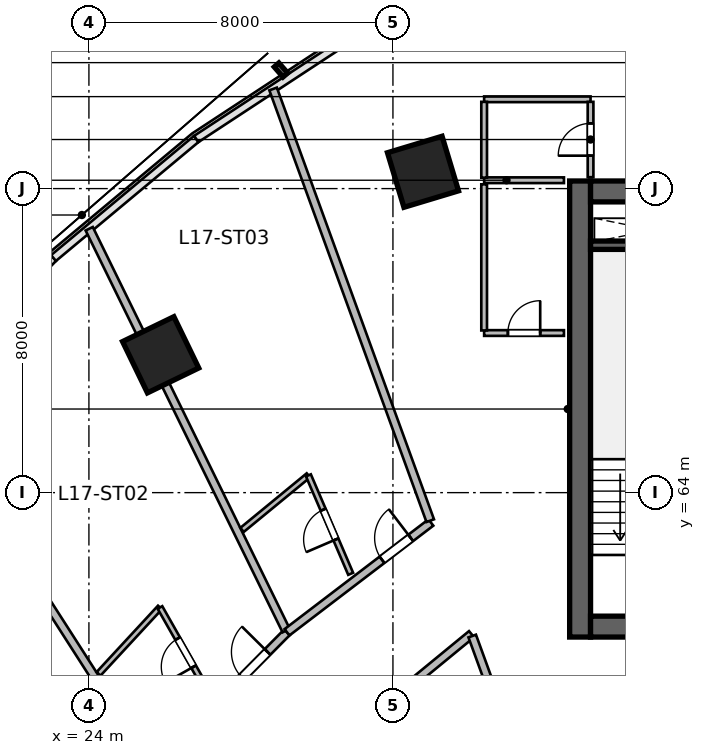
"""IFC4 building model, lengths in metres.
Left out: names, types, materials, properties, quantities, classifications, styles, units other than length and angle.
Written with IfcOpenShell. Run it as: python <this file> out.ifc"""

import sys

from ifc_helpers import new_model, si_unit, direction, frame, frame_2d, origin, origin_2d, place, context, subcontext, project, spatial, rectangle, extrude, source, transform, mapped, element, fill, save


model = new_model("IFC4")
c1 = context("Model", 3, precision=1e-05, world=origin(), true_north=direction((0.0, 1.0)))
c2 = subcontext(c1, "Body", "Model", "MODEL_VIEW")
j1 = project(units=[si_unit("LENGTHUNIT", "METRE"), si_unit("PLANEANGLEUNIT", "RADIAN")], contexts=[c1])
p1 = place(None, origin())
s1 = spatial("IfcSite", under=j1, at=p1, CompositionType="ELEMENT")
p2 = place(p1, origin())
s2 = spatial("IfcBuilding", under=s1, at=p2, CompositionType="ELEMENT")
p3 = place(p2, frame((0.0, 0.0, 75.0)))
s3 = spatial("IfcBuildingStorey", under=s2, at=p3, CompositionType="ELEMENT", Elevation=75.0)
m1 = source(origin(), c2, "Body", "SweptSolid", [
    extrude(rectangle(XDim=12.0, YDim=0.55, at=frame_2d((6.0, 0.0))), origin(), (0.0, 0.0, 1.0), 3.6),
])
p4 = place(p3, frame((36.925, 60.2, 0.0), z_axis=(0.0, 0.0, 1.0), x_axis=(0.0, 1.0, 0.0)))
e1 = element("IfcWall", 1, at=p4, inside=s3, PredefinedType="SHEAR", context=c2, shape_type="MappedRepresentation", body=[
    mapped(m1, transform((0.0, 0.0, 0.0), scale=1.0)),
])
m2 = source(origin(), c2, "Body", "SweptSolid", [
    extrude(rectangle(XDim=21.6, YDim=0.55, at=frame_2d((10.8, 0.0))), origin(), (0.0, 0.0, 1.0), 3.6),
])
p5 = place(p3, frame((37.2, 60.475, 0.0), z_axis=(0.0, 0.0, 1.0), x_axis=(1.0, 0.0, 0.0)))
e2 = element("IfcWall", 2, at=p5, inside=s3, PredefinedType="SHEAR", context=c2, shape_type="MappedRepresentation", body=[
    mapped(m2, transform((0.0, 0.0, 0.0), scale=1.0)),
])
p6 = place(p5, frame((1.1, 0.0, 0.0)))
e3 = element("IfcOpeningElement", 3, at=p6, cuts=e2, PredefinedType="OPENING", context=c2, shape_type="SweptSolid", body=[
    extrude(rectangle(XDim=1.15, YDim=2.15, at=frame_2d((0.575, 1.075))), frame((0.0, 0.285, 0.0), z_axis=(0.0, -1.0, 0.0), x_axis=(1.0, 0.0, 0.0)), (0.0, 0.0, 1.0), 0.57),
])
p7 = place(p5, frame((19.5, 0.0, 0.0)))
e4 = element("IfcOpeningElement", 4, at=p7, cuts=e2, PredefinedType="OPENING", context=c2, shape_type="SweptSolid", body=[
    extrude(rectangle(XDim=0.9, YDim=2.1, at=frame_2d((0.45, 1.05))), frame((0.0, 0.285, 0.0), z_axis=(0.0, -1.0, 0.0), x_axis=(1.0, 0.0, 0.0)), (0.0, 0.0, 1.0), 0.57),
])
p8 = place(p5, frame((12.02, 0.0, 0.0)))
e5 = element("IfcOpeningElement", 5, at=p8, cuts=e2, PredefinedType="OPENING", context=c2, shape_type="SweptSolid", body=[
    extrude(rectangle(XDim=1.6, YDim=2.15, at=frame_2d((0.8, 1.075))), frame((0.0, 0.285, 0.0), z_axis=(0.0, -1.0, 0.0), x_axis=(1.0, 0.0, 0.0)), (0.0, 0.0, 1.0), 0.57),
])
p9 = place(p3, frame((37.2, 71.925, 0.0), z_axis=(0.0, 0.0, 1.0), x_axis=(1.0, 0.0, 0.0)))
e6 = element("IfcWall", 6, at=p9, inside=s3, PredefinedType="SHEAR", context=c2, shape_type="MappedRepresentation", body=[
    mapped(m2, transform((0.0, 0.0, 0.0), scale=1.0)),
])
p10 = place(p9, frame((1.2, 0.0, 0.0)))
e7 = element("IfcOpeningElement", 7, at=p10, cuts=e6, PredefinedType="OPENING", context=c2, shape_type="SweptSolid", body=[
    extrude(rectangle(XDim=0.9, YDim=2.1, at=frame_2d((0.45, 1.05))), frame((0.0, 0.285, 0.0), z_axis=(0.0, -1.0, 0.0), x_axis=(1.0, 0.0, 0.0)), (0.0, 0.0, 1.0), 0.57),
])
p11 = place(p9, frame((14.7, 0.0, 0.0)))
e8 = element("IfcOpeningElement", 8, at=p11, cuts=e6, PredefinedType="OPENING", context=c2, shape_type="SweptSolid", body=[
    extrude(rectangle(XDim=1.2, YDim=2.15, at=frame_2d((0.6, 1.075))), frame((0.0, 0.285, 0.0), z_axis=(0.0, -1.0, 0.0), x_axis=(1.0, 0.0, 0.0)), (0.0, 0.0, 1.0), 0.57),
])
p12 = place(p9, frame((4.15, 0.0, 0.0)))
e9 = element("IfcOpeningElement", 9, at=p12, cuts=e6, PredefinedType="OPENING", context=c2, shape_type="SweptSolid", body=[
    extrude(rectangle(XDim=1.3, YDim=2.15, at=frame_2d((0.65, 1.075))), frame((0.0, 0.285, 0.0), z_axis=(0.0, -1.0, 0.0), x_axis=(1.0, 0.0, 0.0)), (0.0, 0.0, 1.0), 0.57),
])
p13 = place(p9, frame((7.25, 0.0, 0.0)))
e10 = element("IfcOpeningElement", 10, at=p13, cuts=e6, PredefinedType="OPENING", context=c2, shape_type="SweptSolid", body=[
    extrude(rectangle(XDim=0.9, YDim=2.1, at=frame_2d((0.45, 1.05))), frame((0.0, 0.285, 0.0), z_axis=(0.0, -1.0, 0.0), x_axis=(1.0, 0.0, 0.0)), (0.0, 0.0, 1.0), 0.57),
])
p14 = place(p9, frame((10.95, 0.0, 0.0)))
e11 = element("IfcOpeningElement", 11, at=p14, cuts=e6, PredefinedType="OPENING", context=c2, shape_type="SweptSolid", body=[
    extrude(rectangle(XDim=0.9, YDim=2.1, at=frame_2d((0.45, 1.05))), frame((0.0, 0.285, 0.0), z_axis=(0.0, -1.0, 0.0), x_axis=(1.0, 0.0, 0.0)), (0.0, 0.0, 1.0), 0.57),
])
m3 = source(origin(), c2, "Body", "SweptSolid", [
    extrude(rectangle(XDim=3.27, YDim=0.22, at=frame_2d((1.635, 0.0))), origin(), (0.0, 0.0, 1.0), 3.6),
])
p15 = place(p3, frame((37.2, 70.51, 0.0), z_axis=(0.0, 0.0, 1.0), x_axis=(1.0, 0.0, 0.0)))
e12 = element("IfcWall", 12, at=p15, inside=s3, PredefinedType="SHEAR", context=c2, shape_type="MappedRepresentation", body=[
    mapped(m3, transform((0.0, 0.0, 0.0), scale=1.0)),
])
m4 = source(origin(), c2, "Body", "SweptSolid", [
    extrude(rectangle(XDim=1.5, YDim=1.5, at=origin_2d()), origin(), (0.0, 0.0, 1.0), 3.6),
])
for number, where, z_axis, x_axis in (
    (13, (25.888, 67.627, 0.0), (0.0, 0.0, 1.0), (-0.436, 0.9, 0.0)),
    (14, (32.791, 72.442, 0.0), (0.0, 0.0, 1.0), (-0.289, 0.957, 0.0)),
):
    element("IfcColumn", number, at=place(p3, frame(where, z_axis=z_axis, x_axis=x_axis)), inside=s3, PredefinedType="COLUMN", context=c2, shape_type="MappedRepresentation", body=[
        mapped(m4, transform((0.0, 0.0, 0.0), scale=1.0)),
    ])
m5 = source(origin(), c2, "Body", "SweptSolid", [
    extrude(rectangle(XDim=2.1, YDim=0.15, at=frame_2d((1.05, 0.0))), origin(), (0.0, 0.0, 1.0), 3.36),
])
p16 = place(p3, frame((34.4, 72.22, 0.0), z_axis=(0.0, 0.0, 1.0), x_axis=(1.0, 0.0, 0.0)))
e15 = element("IfcWall", 15, at=p16, inside=s3, PredefinedType="PARTITIONING", context=c2, shape_type="MappedRepresentation", body=[
    mapped(m5, transform((0.0, 0.0, 0.0), scale=1.0)),
])
m6 = source(origin(), c2, "Body", "SweptSolid", [
    extrude(rectangle(XDim=2.8, YDim=0.15, at=frame_2d((1.4, 0.0))), origin(), (0.0, 0.0, 1.0), 3.36),
])
p17 = place(p3, frame((34.4, 74.35, 0.0), z_axis=(0.0, 0.0, 1.0), x_axis=(1.0, 0.0, 0.0)))
e16 = element("IfcWall", 16, at=p17, inside=s3, PredefinedType="PARTITIONING", context=c2, shape_type="MappedRepresentation", body=[
    mapped(m6, transform((0.0, 0.0, 0.0), scale=1.0)),
])
m7 = source(origin(), c2, "Body", "SweptSolid", [
    extrude(rectangle(XDim=1.995, YDim=0.15, at=frame_2d((0.998, 0.0))), origin(), (0.0, 0.0, 1.0), 3.36),
])
p18 = place(p3, frame((34.4, 72.288, 0.0), z_axis=(0.0, 0.0, 1.0), x_axis=(0.0, 1.0, 0.0)))
e17 = element("IfcWall", 17, at=p18, inside=s3, PredefinedType="PARTITIONING", context=c2, shape_type="MappedRepresentation", body=[
    mapped(m7, transform((0.0, 0.0, 0.0), scale=1.0)),
])
m8 = source(origin(), c2, "Body", "SweptSolid", [
    extrude(rectangle(XDim=1.982, YDim=0.15, at=frame_2d((0.991, 0.0))), origin(), (0.0, 0.0, 1.0), 3.36),
])
p19 = place(p3, frame((37.2, 72.3, 0.0), z_axis=(0.0, 0.0, 1.0), x_axis=(0.0, 1.0, 0.0)))
e18 = element("IfcWall", 18, at=p19, inside=s3, PredefinedType="PARTITIONING", context=c2, shape_type="MappedRepresentation", body=[
    mapped(m8, transform((0.0, 0.0, 0.0), scale=1.0)),
])
p20 = place(p19, frame((0.566, 0.0, 0.0)))
e19 = element("IfcOpeningElement", 19, at=p20, cuts=e18, PredefinedType="OPENING", context=c2, shape_type="SweptSolid", body=[
    extrude(rectangle(XDim=0.85, YDim=2.1, at=frame_2d((0.425, 1.05))), frame((0.0, 0.085, 0.0), z_axis=(0.0, -1.0, 0.0), x_axis=(1.0, 0.0, 0.0)), (0.0, 0.0, 1.0), 0.17),
])
p21 = place(p3, frame((34.4, 68.2, 0.0), z_axis=(0.0, 0.0, 1.0), x_axis=(1.0, 0.0, 0.0)))
e20 = element("IfcWall", 20, at=p21, inside=s3, PredefinedType="PARTITIONING", context=c2, shape_type="MappedRepresentation", body=[
    mapped(m5, transform((0.0, 0.0, 0.0), scale=1.0)),
])
p22 = place(p21, frame((0.625, 0.0, 0.0)))
e21 = element("IfcOpeningElement", 21, at=p22, cuts=e20, PredefinedType="OPENING", context=c2, shape_type="SweptSolid", body=[
    extrude(rectangle(XDim=0.85, YDim=2.1, at=frame_2d((0.425, 1.05))), frame((0.0, 0.085, 0.0), z_axis=(0.0, -1.0, 0.0), x_axis=(1.0, 0.0, 0.0)), (0.0, 0.0, 1.0), 0.17),
])
m9 = source(origin(), c2, "Body", "SweptSolid", [
    extrude(rectangle(XDim=3.845, YDim=0.15, at=frame_2d((1.922, 0.0))), origin(), (0.0, 0.0, 1.0), 3.36),
])
p23 = place(p3, frame((34.4, 68.268, 0.0), z_axis=(0.0, 0.0, 1.0), x_axis=(0.0, 1.0, 0.0)))
e22 = element("IfcWall", 22, at=p23, inside=s3, PredefinedType="PARTITIONING", context=c2, shape_type="MappedRepresentation", body=[
    mapped(m9, transform((0.0, 0.0, 0.0), scale=1.0)),
])
m10 = source(origin(), c2, "Body", "SweptSolid", [
    extrude(rectangle(XDim=6.721, YDim=0.21, at=frame_2d((3.361, 0.0))), origin(), (0.0, 0.0, 1.0), 3.36),
])
p24 = place(p3, frame((28.874, 56.01, 0.0), z_axis=(0.0, 0.0, 1.0), x_axis=(0.772828051199, 0.63461547671, 0.0)))
e23 = element("IfcWall", 23, at=p24, inside=s3, PredefinedType="PARTITIONING", context=c2, shape_type="MappedRepresentation", body=[
    mapped(m10, transform((0.0, 0.0, 0.0), scale=1.0)),
])
m11 = source(origin(), c2, "Body", "SweptSolid", [
    extrude(rectangle(XDim=12.196, YDim=0.21, at=frame_2d((6.098, 0.0))), origin(), (0.0, 0.0, 1.0), 3.36),
])
p25 = place(p3, frame((38.258, 48.766, 0.0), z_axis=(0.0, 0.0, 1.0), x_axis=(-0.342022711534, 0.939691686031, 0.0)))
e24 = element("IfcWall", 24, at=p25, inside=s3, PredefinedType="PARTITIONING", context=c2, shape_type="MappedRepresentation", body=[
    mapped(m11, transform((0.0, 0.0, 0.0), scale=1.0)),
])
m12 = source(origin(), c2, "Body", "SweptSolid", [
    extrude(rectangle(XDim=11.432, YDim=0.21, at=frame_2d((5.716, 0.0))), origin(), (0.0, 0.0, 1.0), 3.36),
])
p26 = place(p3, frame((25.659, 56.805, 0.0), z_axis=(0.0, 0.0, 1.0), x_axis=(-0.540196183124, 0.841539115988, 0.0)))
e25 = element("IfcWall", 25, at=p26, inside=s3, PredefinedType="PARTITIONING", context=c2, shape_type="MappedRepresentation", body=[
    mapped(m12, transform((0.0, 0.0, 0.0), scale=1.0)),
])
m13 = source(origin(), c2, "Body", "SweptSolid", [
    extrude(rectangle(XDim=5.012, YDim=0.21, at=frame_2d((2.506, 0.0))), origin(), (0.0, 0.0, 1.0), 3.36),
])
p27 = place(p3, frame((25.685, 56.764, 0.0), z_axis=(0.0, 0.0, 1.0), x_axis=(0.703664626435, 0.710532260707, 0.0)))
e26 = element("IfcWall", 26, at=p27, inside=s3, PredefinedType="PARTITIONING", context=c2, shape_type="MappedRepresentation", body=[
    mapped(m13, transform((0.0, 0.0, 0.0), scale=1.0)),
])
p28 = place(p27, frame((3.335, 0.0, 0.0)))
e27 = element("IfcOpeningElement", 27, at=p28, cuts=e26, PredefinedType="OPENING", context=c2, shape_type="SweptSolid", body=[
    extrude(rectangle(XDim=0.95, YDim=2.15, at=frame_2d((0.475, 1.075))), frame((0.0, 0.115, 0.0), z_axis=(0.0, -1.0, 0.0), x_axis=(1.0, 0.0, 0.0)), (0.0, 0.0, 1.0), 0.23),
])
m14 = source(origin(), c2, "Body", "SweptSolid", [
    extrude(rectangle(XDim=11.775, YDim=0.21, at=frame_2d((5.887, 0.0))), origin(), (0.0, 0.0, 1.0), 2.644),
])
p29 = place(p3, frame((29.19, 60.371, 0.0), z_axis=(0.0, 0.0, 1.0), x_axis=(-0.4401500056, 0.897924257702, 0.0)))
e28 = element("IfcWall", 28, at=p29, inside=s3, PredefinedType="PARTITIONING", context=c2, shape_type="MappedRepresentation", body=[
    mapped(m14, transform((0.0, 0.0, 0.0), scale=1.0)),
])
m15 = source(origin(), c2, "Body", "SweptSolid", [
    extrude(rectangle(XDim=2.38, YDim=0.14, at=frame_2d((1.19, 0.0))), origin(), (0.0, 0.0, 1.0), 3.36),
])
p30 = place(p3, frame((24.253, 59.231, 0.0), z_axis=(0.0, 0.0, 1.0), x_axis=(0.679084816758, 0.734059814762, 0.0)))
e29 = element("IfcWall", 29, at=p30, inside=s3, PredefinedType="PARTITIONING", context=c2, shape_type="MappedRepresentation", body=[
    mapped(m15, transform((0.0, 0.0, 0.0), scale=1.0)),
])
m16 = source(origin(), c2, "Body", "SweptSolid", [
    extrude(rectangle(XDim=2.735, YDim=0.14, at=frame_2d((1.367, 0.0))), origin(), (0.0, 0.0, 1.0), 3.36),
])
p31 = place(p3, frame((27.219, 58.6, 0.0), z_axis=(0.0, 0.0, 1.0), x_axis=(-0.493694940578, 0.869635156631, 0.0)))
e30 = element("IfcWall", 30, at=p31, inside=s3, PredefinedType="PARTITIONING", context=c2, shape_type="MappedRepresentation", body=[
    mapped(m16, transform((0.0, 0.0, 0.0), scale=1.0)),
])
p32 = place(p31, frame((0.942, 0.0, 0.0)))
e31 = element("IfcOpeningElement", 31, at=p32, cuts=e30, PredefinedType="OPENING", context=c2, shape_type="SweptSolid", body=[
    extrude(rectangle(XDim=0.85, YDim=2.05, at=frame_2d((0.425, 1.025))), frame((0.0, 0.08, 0.0), z_axis=(0.0, -1.0, 0.0), x_axis=(1.0, 0.0, 0.0)), (0.0, 0.0, 1.0), 0.16),
])
m17 = source(origin(), c2, "Body", "SweptSolid", [
    extrude(rectangle(XDim=4.762, YDim=0.21, at=frame_2d((2.381, 0.0))), origin(), (0.0, 0.0, 1.0), 3.36),
])
p33 = place(p3, frame((29.212, 60.326, 0.0), z_axis=(0.0, 0.0, 1.0), x_axis=(0.795070295872, 0.60651729128, 0.0)))
e32 = element("IfcWall", 32, at=p33, inside=s3, PredefinedType="PARTITIONING", context=c2, shape_type="MappedRepresentation", body=[
    mapped(m17, transform((0.0, 0.0, 0.0), scale=1.0)),
])
p34 = place(p33, frame((3.144, 0.0, 0.0)))
e33 = element("IfcOpeningElement", 33, at=p34, cuts=e32, PredefinedType="OPENING", context=c2, shape_type="SweptSolid", body=[
    extrude(rectangle(XDim=0.95, YDim=2.15, at=frame_2d((0.475, 1.075))), frame((0.0, 0.115, 0.0), z_axis=(0.0, -1.0, 0.0), x_axis=(1.0, 0.0, 0.0)), (0.0, 0.0, 1.0), 0.23),
])
m18 = source(origin(), c2, "Body", "SweptSolid", [
    extrude(rectangle(XDim=12.088, YDim=0.21, at=frame_2d((6.044, 0.0))), origin(), (0.0, 0.0, 1.0), 3.36),
])
p35 = place(p3, frame((32.981, 63.262, 0.0), z_axis=(0.0, 0.0, 1.0), x_axis=(-0.34203007529, 0.939689005787, 0.0)))
e34 = element("IfcWall", 34, at=p35, inside=s3, PredefinedType="PARTITIONING", context=c2, shape_type="MappedRepresentation", body=[
    mapped(m18, transform((0.0, 0.0, 0.0), scale=1.0)),
])
m19 = source(origin(), c2, "Body", "SweptSolid", [
    extrude(rectangle(XDim=2.26, YDim=0.14, at=frame_2d((1.13, 0.0))), origin(), (0.0, 0.0, 1.0), 3.36),
])
p36 = place(p3, frame((28.029, 63.02, 0.0), z_axis=(0.0, 0.0, 1.0), x_axis=(0.772646789219, 0.634836151388, 0.0)))
e35 = element("IfcWall", 35, at=p36, inside=s3, PredefinedType="PARTITIONING", context=c2, shape_type="MappedRepresentation", body=[
    mapped(m19, transform((0.0, 0.0, 0.0), scale=1.0)),
])
m20 = source(origin(), c2, "Body", "SweptSolid", [
    extrude(rectangle(XDim=2.819, YDim=0.14, at=frame_2d((1.409, 0.0))), origin(), (0.0, 0.0, 1.0), 3.36),
])
p37 = place(p3, frame((30.888, 61.864, 0.0), z_axis=(0.0, 0.0, 1.0), x_axis=(-0.394420979357, 0.918929861874, 0.0)))
e36 = element("IfcWall", 36, at=p37, inside=s3, PredefinedType="PARTITIONING", context=c2, shape_type="MappedRepresentation", body=[
    mapped(m20, transform((0.0, 0.0, 0.0), scale=1.0)),
])
p38 = place(p37, frame((0.984, 0.0, 0.0)))
e37 = element("IfcOpeningElement", 37, at=p38, cuts=e36, PredefinedType="OPENING", context=c2, shape_type="SweptSolid", body=[
    extrude(rectangle(XDim=0.85, YDim=2.05, at=frame_2d((0.425, 1.025))), frame((0.0, 0.08, 0.0), z_axis=(0.0, -1.0, 0.0), x_axis=(1.0, 0.0, 0.0)), (0.0, 0.0, 1.0), 0.16),
])
m21 = source(origin(), c2, "Body", "SweptSolid", [
    extrude(rectangle(XDim=0.85, YDim=2.1, at=frame_2d((0.425, 1.05))), frame((0.0, 0.025, 0.0), z_axis=(0.0, -1.0, 0.0), x_axis=(1.0, 0.0, 0.0)), (0.0, 0.0, 1.0), 0.05),
])
p39 = place(p20, origin())
e38 = element("IfcDoor", 38, at=p39, inside=s3, OperationType="SINGLE_SWING_LEFT", PredefinedType="DOOR", context=c2, shape_type="MappedRepresentation", body=[
    mapped(m21, transform((0.0, 0.0, 0.0), scale=1.0)),
])
fill(e19, e38)
p40 = place(p22, origin())
e39 = element("IfcDoor", 39, at=p40, inside=s3, OperationType="SINGLE_SWING_RIGHT", PredefinedType="DOOR", context=c2, shape_type="MappedRepresentation", body=[
    mapped(m21, transform((0.0, 0.0, 0.0), scale=1.0)),
])
fill(e21, e39)
m22 = source(origin(), c2, "Body", "SweptSolid", [
    extrude(rectangle(XDim=0.95, YDim=2.15, at=frame_2d((0.475, 1.075))), frame((0.0, 0.025, 0.0), z_axis=(0.0, -1.0, 0.0), x_axis=(1.0, 0.0, 0.0)), (0.0, 0.0, 1.0), 0.05),
])
p41 = place(p28, origin())
e40 = element("IfcDoor", 40, at=p41, inside=s3, OperationType="SINGLE_SWING_RIGHT", PredefinedType="DOOR", context=c2, shape_type="MappedRepresentation", body=[
    mapped(m22, transform((0.0, 0.0, 0.0), scale=1.0)),
])
fill(e27, e40)
m23 = source(origin(), c2, "Body", "SweptSolid", [
    extrude(rectangle(XDim=0.85, YDim=2.05, at=frame_2d((0.425, 1.025))), frame((0.0, 0.025, 0.0), z_axis=(0.0, -1.0, 0.0), x_axis=(1.0, 0.0, 0.0)), (0.0, 0.0, 1.0), 0.05),
])
p42 = place(p32, origin())
e41 = element("IfcDoor", 41, at=p42, inside=s3, OperationType="SINGLE_SWING_LEFT", PredefinedType="DOOR", context=c2, shape_type="MappedRepresentation", body=[
    mapped(m23, transform((0.0, 0.0, 0.0), scale=1.0)),
])
fill(e31, e41)
p43 = place(p34, origin())
e42 = element("IfcDoor", 42, at=p43, inside=s3, OperationType="SINGLE_SWING_RIGHT", PredefinedType="DOOR", context=c2, shape_type="MappedRepresentation", body=[
    mapped(m22, transform((0.0, 0.0, 0.0), scale=1.0)),
])
fill(e33, e42)
p44 = place(p38, origin())
e43 = element("IfcDoor", 43, at=p44, inside=s3, OperationType="SINGLE_SWING_LEFT", PredefinedType="DOOR", context=c2, shape_type="MappedRepresentation", body=[
    mapped(m23, transform((0.0, 0.0, 0.0), scale=1.0)),
])
fill(e37, e43)
save(model, sys.argv[1])
